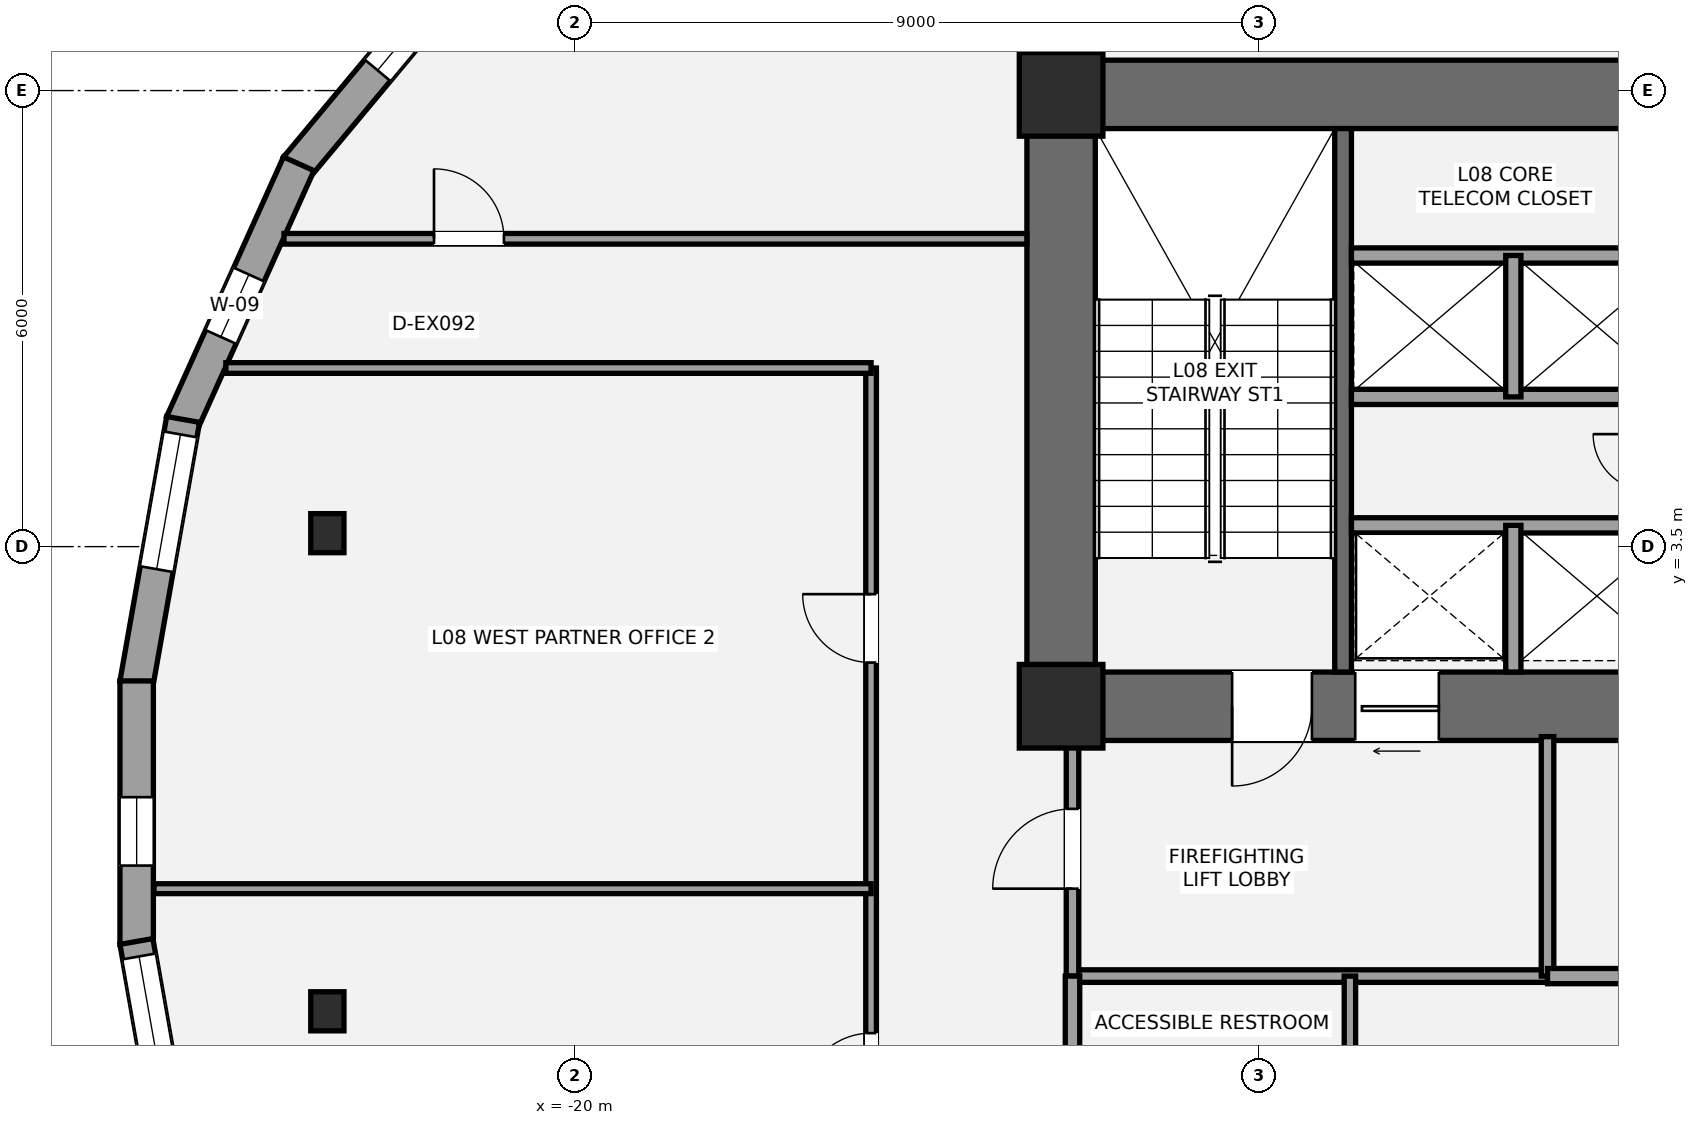
"""IFC4 building model, lengths in metres.
Left out: names, types, materials, properties, quantities, classifications, styles, units other than length and angle.
Written with IfcOpenShell. Run it as: python <this file> out.ifc"""

import sys

from ifc_helpers import new_model, si_unit, direction, frame, frame_2d, origin, origin_2d, place, context, subcontext, project, spatial, rectangle, i_section, extrude, element, fill, save


model = new_model("IFC4")
c1 = context("Model", 3, precision=1e-05, world=origin(), true_north=direction((0.0, 1.0)))
c2 = subcontext(c1, "Body", "Model", "MODEL_VIEW")
j1 = project(units=[si_unit("LENGTHUNIT", "METRE"), si_unit("PLANEANGLEUNIT", "RADIAN")], contexts=[c1])
p1 = place(None, origin())
s1 = spatial("IfcSite", under=j1, at=p1, CompositionType="ELEMENT")
p2 = place(p1, origin())
s2 = spatial("IfcBuilding", under=s1, at=p2, CompositionType="ELEMENT")
p3 = place(p2, frame((0.0, 0.0, 34.2)))
s3 = spatial("IfcBuildingStorey", under=s2, at=p3, CompositionType="ELEMENT", Elevation=34.2)
p4 = place(p3, frame((-13.6, 0.95, 0.0), z_axis=(0.0, 0.0, 1.0), x_axis=(0.0, 1.0, 0.0)))
e1 = element("IfcWall", 1, at=p4, inside=s3, PredefinedType="SHEAR", context=c2, shape_type="SweptSolid", body=[
    extrude(rectangle(XDim=8.95, YDim=0.9, at=frame_2d((4.475, 0.0))), origin(), (0.0, 0.0, 1.0), 3.6),
])
p5 = place(p3, frame((-14.05, 9.45, 0.0), z_axis=(0.0, 0.0, 1.0), x_axis=(1.0, 0.0, 0.0)))
e2 = element("IfcWall", 2, at=p5, inside=s3, PredefinedType="SHEAR", context=c2, shape_type="SweptSolid", body=[
    extrude(rectangle(XDim=9.7, YDim=0.9, at=frame_2d((4.85, 0.0))), origin(), (0.0, 0.0, 1.0), 3.6),
])
p6 = place(p3, frame((-4.75, 1.4, 0.0), z_axis=(0.0, 0.0, 1.0), x_axis=(-1.0, 0.0, 0.0)))
e3 = element("IfcWall", 3, at=p6, inside=s3, PredefinedType="SHEAR", context=c2, shape_type="SweptSolid", body=[
    extrude(rectangle(XDim=9.3, YDim=0.9, at=frame_2d((4.65, 0.0))), origin(), (0.0, 0.0, 1.0), 3.6),
])
p7 = place(p6, frame((5.55, 0.0, 0.0)))
e4 = element("IfcOpeningElement", 4, at=p7, cuts=e3, PredefinedType="OPENING", context=c2, shape_type="SweptSolid", body=[
    extrude(rectangle(XDim=1.05, YDim=2.15, at=frame_2d((0.525, 1.075))), frame((0.0, 0.46, 0.0), z_axis=(0.0, -1.0, 0.0), x_axis=(1.0, 0.0, 0.0)), (0.0, 0.0, 1.0), 0.92),
])
p8 = place(p6, frame((3.88, 0.0, 0.0)))
e5 = element("IfcOpeningElement", 5, at=p8, cuts=e3, PredefinedType="OPENING", context=c2, shape_type="SweptSolid", body=[
    extrude(rectangle(XDim=1.1, YDim=2.2, at=frame_2d((0.55, 1.1))), frame((0.0, 0.46, 0.0), z_axis=(0.0, -1.0, 0.0), x_axis=(1.0, 0.0, 0.0)), (0.0, 0.0, 1.0), 0.92),
])
p9 = place(p3, frame((-9.89, 1.85, 0.0), z_axis=(0.0, 0.0, 1.0), x_axis=(0.0, 1.0, 0.0)))
e6 = element("IfcWall", 6, at=p9, inside=s3, PredefinedType="SHEAR", context=c2, shape_type="SweptSolid", body=[
    extrude(rectangle(XDim=7.15, YDim=0.22, at=frame_2d((3.575, 0.0))), origin(), (0.0, 0.0, 1.0), 3.6),
])
for number, where, z_axis, x_axis in (
    (7, (-13.6, 1.4, 0.0), (0.0, 0.0, 1.0), (1.0, 0.0, 0.0)),
    (8, (-13.6, 9.45, 0.0), (0.0, 0.0, 1.0), (1.0, 0.0, 0.0)),
):
    element("IfcColumn", number, at=place(p3, frame(where, z_axis=z_axis, x_axis=x_axis)), inside=s3, PredefinedType="COLUMN", context=c2, shape_type="SweptSolid", body=[
        extrude(rectangle(XDim=1.1, YDim=1.1, at=origin_2d()), origin(), (0.0, 0.0, 1.0), 3.6),
    ])
for number, where, z_axis, x_axis in (
    (9, (-23.254, 3.677, 0.0), (0.0, 0.0, 1.0), (1.0, 0.0, 0.0)),
    (10, (-23.254, -2.613, 0.0), (0.0, 0.0, 1.0), (1.0, 0.0, 0.0)),
):
    element("IfcColumn", number, at=place(p3, frame(where, z_axis=z_axis, x_axis=x_axis)), inside=s3, PredefinedType="COLUMN", context=c2, shape_type="SweptSolid", body=[
        extrude(i_section(OverallWidth=0.437, OverallDepth=0.514, WebThickness=0.061, FlangeThickness=0.097, at=origin_2d()), origin(), (0.0, 0.0, 1.0), 3.6),
    ])
p10 = place(p3, frame((-23.662, 8.486, 0.0), z_axis=(0.0, 0.0, 1.0), x_axis=(0.64070435578, 0.767787684509, 0.0)))
e11 = element("IfcWall", 11, at=p10, inside=s3, PredefinedType="STANDARD", context=c2, shape_type="SweptSolid", body=[
    extrude(rectangle(XDim=4.109, YDim=0.44, at=frame_2d((2.055, 0.0))), origin(), (0.0, 0.0, 1.0), 2.533),
])
p11 = place(p10, frame((1.669, 0.0, 0.65)))
e12 = element("IfcOpeningElement", 12, at=p11, cuts=e11, PredefinedType="OPENING", context=c2, shape_type="SweptSolid", body=[
    extrude(rectangle(XDim=1.8, YDim=1.7, at=frame_2d((0.9, 0.85))), frame((0.0, 0.23, 0.0), z_axis=(0.0, -1.0, 0.0), x_axis=(1.0, 0.0, 0.0)), (0.0, 0.0, 1.0), 0.46),
])
p12 = place(p3, frame((-25.167, 5.121, 0.0), z_axis=(0.0, 0.0, 1.0), x_axis=(0.410386362845, 0.911911746383, 0.0)))
e13 = element("IfcWall", 13, at=p12, inside=s3, PredefinedType="STANDARD", context=c2, shape_type="SweptSolid", body=[
    extrude(rectangle(XDim=3.745, YDim=0.44, at=frame_2d((1.873, 0.0))), origin(), (0.0, 0.0, 1.0), 2.533),
])
p13 = place(p12, frame((1.248, 0.0, 0.58)))
e14 = element("IfcOpeningElement", 14, at=p13, cuts=e13, PredefinedType="OPENING", context=c2, shape_type="SweptSolid", body=[
    extrude(rectangle(XDim=0.9, YDim=1.35, at=frame_2d((0.45, 0.675))), frame((0.0, 0.23, 0.0), z_axis=(0.0, -1.0, 0.0), x_axis=(1.0, 0.0, 0.0)), (0.0, 0.0, 1.0), 0.46),
])
p14 = place(p3, frame((-25.766, 1.695, 0.0), z_axis=(0.0, 0.0, 1.0), x_axis=(0.174041624961, 0.984738296595, 0.0)))
e15 = element("IfcWall", 15, at=p14, inside=s3, PredefinedType="STANDARD", context=c2, shape_type="SweptSolid", body=[
    extrude(rectangle(XDim=3.532, YDim=0.44, at=frame_2d((1.766, 0.0))), origin(), (0.0, 0.0, 1.0), 2.533),
])
p15 = place(p14, frame((1.532, 0.0, 0.65)))
e16 = element("IfcOpeningElement", 16, at=p15, cuts=e15, PredefinedType="OPENING", context=c2, shape_type="SweptSolid", body=[
    extrude(rectangle(XDim=1.8, YDim=1.7, at=frame_2d((0.9, 0.85))), frame((0.0, 0.23, 0.0), z_axis=(0.0, -1.0, 0.0), x_axis=(1.0, 0.0, 0.0)), (0.0, 0.0, 1.0), 0.46),
])
p16 = place(p3, frame((-25.763, -1.733, 0.0), z_axis=(0.0, 0.0, 1.0), x_axis=(0.0, 1.0, 0.0)))
e17 = element("IfcWall", 17, at=p16, inside=s3, PredefinedType="STANDARD", context=c2, shape_type="SweptSolid", body=[
    extrude(rectangle(XDim=3.466, YDim=0.44, at=frame_2d((1.733, 0.0))), origin(), (0.0, 0.0, 1.0), 2.533),
])
p17 = place(p16, frame((1.037, 0.0, 0.58)))
e18 = element("IfcOpeningElement", 18, at=p17, cuts=e17, PredefinedType="OPENING", context=c2, shape_type="SweptSolid", body=[
    extrude(rectangle(XDim=0.9, YDim=1.35, at=frame_2d((0.45, 0.675))), frame((0.0, 0.23, 0.0), z_axis=(0.0, -1.0, 0.0), x_axis=(1.0, 0.0, 0.0)), (0.0, 0.0, 1.0), 0.46),
])
p18 = place(p3, frame((-25.152, -5.173, 0.0), z_axis=(0.0, 0.0, 1.0), x_axis=(-0.174041624961, 0.984738296595, 0.0)))
e19 = element("IfcWall", 19, at=p18, inside=s3, PredefinedType="STANDARD", context=c2, shape_type="SweptSolid", body=[
    extrude(rectangle(XDim=3.532, YDim=0.44, at=frame_2d((1.766, 0.0))), origin(), (0.0, 0.0, 1.0), 2.533),
])
p19 = place(p18, frame((1.532, 0.0, 0.65)))
e20 = element("IfcOpeningElement", 20, at=p19, cuts=e19, PredefinedType="OPENING", context=c2, shape_type="SweptSolid", body=[
    extrude(rectangle(XDim=1.8, YDim=1.7, at=frame_2d((0.9, 0.85))), frame((0.0, 0.23, 0.0), z_axis=(0.0, -1.0, 0.0), x_axis=(1.0, 0.0, 0.0)), (0.0, 0.0, 1.0), 0.46),
])
p20 = place(p3, frame((-13.45, -2.15, 0.0), z_axis=(0.0, 0.0, 1.0), x_axis=(1.0, 0.0, 0.0)))
e21 = element("IfcWall", 21, at=p20, inside=s3, PredefinedType="PARTITIONING", context=c2, shape_type="SweptSolid", body=[
    extrude(rectangle(XDim=6.25, YDim=0.165, at=frame_2d((3.125, 0.0))), origin(), (0.0, 0.0, 1.0), 3.4),
])
p21 = place(p3, frame((-13.45, -2.15, 0.0), z_axis=(0.0, 0.0, 1.0), x_axis=(0.0, 1.0, 0.0)))
e22 = element("IfcWall", 22, at=p21, inside=s3, PredefinedType="PARTITIONING", context=c2, shape_type="SweptSolid", body=[
    extrude(rectangle(XDim=3.15, YDim=0.165, at=frame_2d((1.575, 0.0))), origin(), (0.0, 0.0, 1.0), 2.853),
])
p22 = place(p21, frame((1.15, 0.0, 0.0)))
e23 = element("IfcOpeningElement", 23, at=p22, cuts=e22, PredefinedType="OPENING", context=c2, shape_type="SweptSolid", body=[
    extrude(rectangle(XDim=1.05, YDim=2.15, at=frame_2d((0.525, 1.075))), frame((0.0, 0.093, 0.0), z_axis=(0.0, -1.0, 0.0), x_axis=(1.0, 0.0, 0.0)), (0.0, 0.0, 1.0), 0.185),
])
p23 = place(p3, frame((-7.2, -2.15, 0.0), z_axis=(0.0, 0.0, 1.0), x_axis=(0.0, 1.0, 0.0)))
e24 = element("IfcWall", 24, at=p23, inside=s3, PredefinedType="PARTITIONING", context=c2, shape_type="SweptSolid", body=[
    extrude(rectangle(XDim=3.15, YDim=0.165, at=frame_2d((1.575, 0.0))), origin(), (0.0, 0.0, 1.0), 3.4),
])
p24 = place(p3, frame((-7.2, -2.15, 0.0), z_axis=(0.0, 0.0, 1.0), x_axis=(1.0, 0.0, 0.0)))
e25 = element("IfcWall", 25, at=p24, inside=s3, PredefinedType="SOLIDWALL", context=c2, shape_type="SweptSolid", body=[
    extrude(rectangle(XDim=2.25, YDim=0.2, at=frame_2d((1.125, 0.0))), origin(), (0.0, 0.0, 1.0), 3.4),
])
p25 = place(p3, frame((-9.78, 3.78, 0.0), z_axis=(0.0, 0.0, 1.0), x_axis=(1.0, 0.0, 0.0)))
e26 = element("IfcWall", 26, at=p25, inside=s3, PredefinedType="SOLIDWALL", context=c2, shape_type="SweptSolid", body=[
    extrude(rectangle(XDim=4.13, YDim=0.2, at=frame_2d((2.065, 0.0))), origin(), (0.0, 0.0, 1.0), 3.4),
])
p26 = place(p3, frame((-7.65, 1.85, 0.0), z_axis=(0.0, 0.0, 1.0), x_axis=(0.0, 1.0, 0.0)))
e27 = element("IfcWall", 27, at=p26, inside=s3, PredefinedType="SOLIDWALL", context=c2, shape_type="SweptSolid", body=[
    extrude(rectangle(XDim=1.93, YDim=0.2, at=frame_2d((0.965, 0.0))), origin(), (0.0, 0.0, 1.0), 3.4),
])
for number, where, z_axis, x_axis in (
    (28, (-9.78, 5.47, 0.0), (0.0, 0.0, 1.0), (1.0, 0.0, 0.0)),
    (29, (-9.78, 7.33, 0.0), (0.0, 0.0, 1.0), (1.0, 0.0, 0.0)),
):
    element("IfcWall", number, at=place(p3, frame(where, z_axis=z_axis, x_axis=x_axis)), inside=s3, PredefinedType="SOLIDWALL", context=c2, shape_type="SweptSolid", body=[
        extrude(rectangle(XDim=4.13, YDim=0.2, at=frame_2d((2.065, 0.0))), origin(), (0.0, 0.0, 1.0), 3.4),
    ])
p27 = place(p3, frame((-7.65, 5.47, 0.0), z_axis=(0.0, 0.0, 1.0), x_axis=(0.0, 1.0, 0.0)))
e30 = element("IfcWall", 30, at=p27, inside=s3, PredefinedType="SOLIDWALL", context=c2, shape_type="SweptSolid", body=[
    extrude(rectangle(XDim=1.86, YDim=0.2, at=frame_2d((0.93, 0.0))), origin(), (0.0, 0.0, 1.0), 3.4),
])
p28 = place(p3, frame((-13.45, -4.05, 0.0), z_axis=(0.0, 0.0, 1.0), x_axis=(0.0, 1.0, 0.0)))
e31 = element("IfcWall", 31, at=p28, inside=s3, PredefinedType="PLUMBINGWALL", context=c2, shape_type="SweptSolid", body=[
    extrude(rectangle(XDim=1.9, YDim=0.19, at=frame_2d((0.95, 0.0))), origin(), (0.0, 0.0, 1.0), 2.853),
])
p29 = place(p3, frame((-9.8, -4.05, 0.0), z_axis=(0.0, 0.0, 1.0), x_axis=(0.0, 1.0, 0.0)))
e32 = element("IfcWall", 32, at=p29, inside=s3, PredefinedType="PLUMBINGWALL", context=c2, shape_type="SweptSolid", body=[
    extrude(rectangle(XDim=1.9, YDim=0.15, at=frame_2d((0.95, 0.0))), origin(), (0.0, 0.0, 1.0), 3.4),
])
p30 = place(p3, frame((-16.1, -14.373, 0.0), z_axis=(0.0, 0.0, 1.0), x_axis=(0.0, 1.0, 0.0)))
e33 = element("IfcWall", 33, at=p30, inside=s3, PredefinedType="PARTITIONING", context=c2, shape_type="SweptSolid", body=[
    extrude(rectangle(XDim=20.223, YDim=0.14, at=frame_2d((10.111, 0.0))), origin(), (0.0, 0.0, 1.0), 2.841),
])
p31 = place(p30, frame((10.573, 0.0, 0.0)))
e34 = element("IfcOpeningElement", 34, at=p31, cuts=e33, PredefinedType="OPENING", context=c2, shape_type="SweptSolid", body=[
    extrude(rectangle(XDim=0.9, YDim=2.1, at=frame_2d((0.45, 1.05))), frame((0.0, 0.08, 0.0), z_axis=(0.0, -1.0, 0.0), x_axis=(1.0, 0.0, 0.0)), (0.0, 0.0, 1.0), 0.16),
])
p32 = place(p30, frame((16.347, 0.0, 0.0)))
e35 = element("IfcOpeningElement", 35, at=p32, cuts=e33, PredefinedType="OPENING", context=c2, shape_type="SweptSolid", body=[
    extrude(rectangle(XDim=0.9, YDim=2.1, at=frame_2d((0.45, 1.05))), frame((0.0, 0.08, 0.0), z_axis=(0.0, -1.0, 0.0), x_axis=(1.0, 0.0, 0.0)), (0.0, 0.0, 1.0), 0.16),
])
p33 = place(p3, frame((-23.824, 7.55, 0.0), z_axis=(0.0, 0.0, 1.0), x_axis=(1.0, 0.0, 0.0)))
e36 = element("IfcWall", 36, at=p33, inside=s3, PredefinedType="PARTITIONING", context=c2, shape_type="SweptSolid", body=[
    extrude(rectangle(XDim=9.774, YDim=0.14, at=frame_2d((4.887, 0.0))), origin(), (0.0, 0.0, 1.0), 2.853),
])
p34 = place(p33, frame((1.974, 0.0, 0.0)))
e37 = element("IfcOpeningElement", 37, at=p34, cuts=e36, PredefinedType="OPENING", context=c2, shape_type="SweptSolid", body=[
    extrude(rectangle(XDim=0.92, YDim=2.15, at=frame_2d((0.46, 1.075))), frame((0.0, 0.08, 0.0), z_axis=(0.0, -1.0, 0.0), x_axis=(1.0, 0.0, 0.0)), (0.0, 0.0, 1.0), 0.16),
])
p35 = place(p3, frame((-24.59, 5.85, 0.0), z_axis=(0.0, 0.0, 1.0), x_axis=(1.0, 0.0, 0.0)))
e38 = element("IfcWall", 38, at=p35, inside=s3, PredefinedType="PARTITIONING", context=c2, shape_type="SweptSolid", body=[
    extrude(rectangle(XDim=8.49, YDim=0.14, at=frame_2d((4.245, 0.0))), origin(), (0.0, 0.0, 1.0), 3.4),
])
p36 = place(p3, frame((-25.535, -1.0, 0.0), z_axis=(0.0, 0.0, 1.0), x_axis=(1.0, 0.0, 0.0)))
e39 = element("IfcWall", 39, at=p36, inside=s3, PredefinedType="PARTITIONING", context=c2, shape_type="SweptSolid", body=[
    extrude(rectangle(XDim=9.435, YDim=0.13, at=frame_2d((4.717, 0.0))), origin(), (0.0, 0.0, 1.0), 2.841),
])
p37 = place(p11, origin())
e40 = element("IfcWindow", 40, at=p37, inside=s3, PartitioningType="SINGLE_PANEL", PredefinedType="WINDOW", context=c2, shape_type="SweptSolid", body=[
    extrude(rectangle(XDim=1.8, YDim=1.7, at=frame_2d((0.9, 0.85))), frame((0.0, -0.01, 0.0), z_axis=(0.0, -1.0, 0.0), x_axis=(1.0, 0.0, 0.0)), (0.0, 0.0, 1.0), 0.06),
])
fill(e12, e40)
p38 = place(p13, origin())
e41 = element("IfcWindow", 41, at=p38, inside=s3, PartitioningType="SINGLE_PANEL", PredefinedType="WINDOW", context=c2, shape_type="SweptSolid", body=[
    extrude(rectangle(XDim=0.9, YDim=1.35, at=frame_2d((0.45, 0.675))), frame((0.0, -0.01, 0.0), z_axis=(0.0, -1.0, 0.0), x_axis=(1.0, 0.0, 0.0)), (0.0, 0.0, 1.0), 0.06),
])
fill(e14, e41)
p39 = place(p15, origin())
e42 = element("IfcWindow", 42, at=p39, inside=s3, PartitioningType="SINGLE_PANEL", PredefinedType="WINDOW", context=c2, shape_type="SweptSolid", body=[
    extrude(rectangle(XDim=1.8, YDim=1.7, at=frame_2d((0.9, 0.85))), frame((0.0, -0.01, 0.0), z_axis=(0.0, -1.0, 0.0), x_axis=(1.0, 0.0, 0.0)), (0.0, 0.0, 1.0), 0.06),
])
fill(e16, e42)
p40 = place(p17, origin())
e43 = element("IfcWindow", 43, at=p40, inside=s3, PartitioningType="SINGLE_PANEL", PredefinedType="WINDOW", context=c2, shape_type="SweptSolid", body=[
    extrude(rectangle(XDim=0.9, YDim=1.35, at=frame_2d((0.45, 0.675))), frame((0.0, -0.01, 0.0), z_axis=(0.0, -1.0, 0.0), x_axis=(1.0, 0.0, 0.0)), (0.0, 0.0, 1.0), 0.06),
])
fill(e18, e43)
p41 = place(p19, origin())
e44 = element("IfcWindow", 44, at=p41, inside=s3, PartitioningType="SINGLE_PANEL", PredefinedType="WINDOW", context=c2, shape_type="SweptSolid", body=[
    extrude(rectangle(XDim=1.8, YDim=1.7, at=frame_2d((0.9, 0.85))), frame((0.0, -0.01, 0.0), z_axis=(0.0, -1.0, 0.0), x_axis=(1.0, 0.0, 0.0)), (0.0, 0.0, 1.0), 0.06),
])
fill(e20, e44)
p42 = place(p7, origin())
e45 = element("IfcDoor", 45, at=p42, inside=s3, OperationType="SINGLE_SWING_RIGHT", PredefinedType="DOOR", context=c2, shape_type="SweptSolid", body=[
    extrude(rectangle(XDim=1.05, YDim=2.15, at=frame_2d((0.525, 1.075))), frame((0.0, 0.025, 0.0), z_axis=(0.0, -1.0, 0.0), x_axis=(1.0, 0.0, 0.0)), (0.0, 0.0, 1.0), 0.05),
])
fill(e4, e45)
p43 = place(p22, origin())
e46 = element("IfcDoor", 46, at=p43, inside=s3, OperationType="SINGLE_SWING_LEFT", PredefinedType="DOOR", context=c2, shape_type="SweptSolid", body=[
    extrude(rectangle(XDim=1.05, YDim=2.15, at=frame_2d((0.525, 1.075))), frame((0.0, 0.025, 0.0), z_axis=(0.0, -1.0, 0.0), x_axis=(1.0, 0.0, 0.0)), (0.0, 0.0, 1.0), 0.05),
])
fill(e23, e46)
p44 = place(p8, origin())
e47 = element("IfcDoor", 47, at=p44, inside=s3, OperationType="SLIDING_TO_LEFT", PredefinedType="DOOR", context=c2, shape_type="SweptSolid", body=[
    extrude(rectangle(XDim=1.1, YDim=2.2, at=frame_2d((0.55, 1.1))), frame((0.0, 0.025, 0.0), z_axis=(0.0, -1.0, 0.0), x_axis=(1.0, 0.0, 0.0)), (0.0, 0.0, 1.0), 0.05),
])
fill(e5, e47)
p45 = place(p34, origin())
e48 = element("IfcDoor", 48, at=p45, inside=s3, OperationType="SINGLE_SWING_LEFT", PredefinedType="DOOR", context=c2, shape_type="SweptSolid", body=[
    extrude(rectangle(XDim=0.92, YDim=2.15, at=frame_2d((0.46, 1.075))), frame((0.0, 0.025, 0.0), z_axis=(0.0, -1.0, 0.0), x_axis=(1.0, 0.0, 0.0)), (0.0, 0.0, 1.0), 0.05),
])
fill(e37, e48)
p46 = place(p31, origin())
e49 = element("IfcDoor", 49, at=p46, inside=s3, OperationType="SINGLE_SWING_LEFT", PredefinedType="DOOR", context=c2, shape_type="SweptSolid", body=[
    extrude(rectangle(XDim=0.9, YDim=2.1, at=frame_2d((0.45, 1.05))), frame((0.0, 0.025, 0.0), z_axis=(0.0, -1.0, 0.0), x_axis=(1.0, 0.0, 0.0)), (0.0, 0.0, 1.0), 0.05),
])
fill(e34, e49)
p47 = place(p32, origin())
e50 = element("IfcDoor", 50, at=p47, inside=s3, OperationType="SINGLE_SWING_RIGHT", PredefinedType="DOOR", context=c2, shape_type="SweptSolid", body=[
    extrude(rectangle(XDim=0.9, YDim=2.1, at=frame_2d((0.45, 1.05))), frame((0.0, 0.025, 0.0), z_axis=(0.0, -1.0, 0.0), x_axis=(1.0, 0.0, 0.0)), (0.0, 0.0, 1.0), 0.05),
])
fill(e35, e50)
save(model, sys.argv[1])
